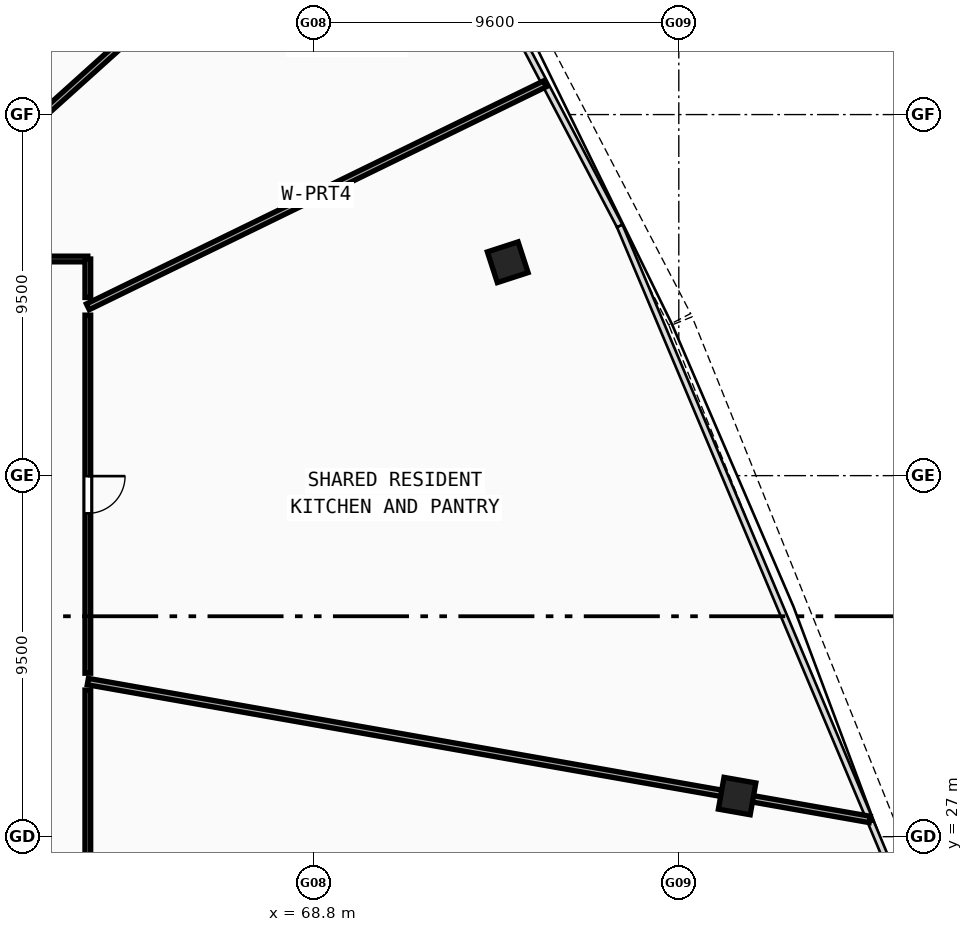
"""IFC4 building model, lengths in metres.
Left out: names, types, materials, properties, quantities, classifications, styles, units other than length and angle.
Written with IfcOpenShell. Run it as: python <this file> out.ifc"""

import sys

from ifc_helpers import new_model, si_unit, direction, frame, frame_2d, origin, origin_with_axes, origin_2d, place, context, subcontext, project, spatial, rectangle, hollow_rectangle, extrude, source, transform, mapped, element, fill, save


model = new_model("IFC4")
c1 = context("Model", 3, precision=1e-05, world=origin(), true_north=direction((0.0, 1.0)))
c2 = subcontext(c1, "Body", "Model", "MODEL_VIEW")
j1 = project(units=[si_unit("LENGTHUNIT", "METRE"), si_unit("PLANEANGLEUNIT", "RADIAN")], contexts=[c1])
p1 = place(None, origin())
s1 = spatial("IfcSite", under=j1, at=p1, CompositionType="ELEMENT")
p2 = place(p1, origin())
s2 = spatial("IfcBuilding", under=s1, at=p2, CompositionType="ELEMENT")
p3 = place(p2, frame((0.0, 0.0, 229.61)))
s3 = spatial("IfcBuildingStorey", under=s2, at=p3, CompositionType="ELEMENT", Elevation=229.61)
m1 = source(origin(), c2, "Body", "SweptSolid", [
    extrude(hollow_rectangle(XDim=0.85, YDim=0.85, WallThickness=0.034, at=origin_2d()), origin(), (0.0, 0.0, 1.0), 3.73),
])
for number, where, z_axis, x_axis in (
    (1, (79.934, 28.069, -0.26), (0.0, 0.0, 1.0), (0.174, 0.985, 0.0)),
    (2, (73.899, 42.115, -0.26), (0.0, 0.0, 1.0), (-0.309, 0.951, 0.0)),
):
    element("IfcColumn", number, at=place(p3, frame(where, z_axis=z_axis, x_axis=x_axis)), inside=s3, PredefinedType="COLUMN", context=c2, shape_type="MappedRepresentation", body=[
        mapped(m1, transform((0.0, 0.0, 0.0), scale=1.0)),
    ])
p4 = place(p3, frame((62.85, 40.943, 0.0), z_axis=(0.0, 0.0, 1.0), x_axis=(0.89879807188, 0.438362893029, 0.0)))
e3 = element("IfcWall", 3, at=p4, inside=s3, PredefinedType="PARTITIONING", context=c2, shape_type="SweptSolid", body=[
    extrude(rectangle(XDim=13.384, YDim=0.17, at=frame_2d((6.692, 0.0))), origin(), (0.0, 0.0, 1.0), 2.82),
])
p5 = place(p3, frame((57.44, 42.2, 0.0), z_axis=(0.0, 0.0, 1.0), x_axis=(0.743147575456, 0.669127552185, 0.0)))
e4 = element("IfcWall", 4, at=p5, inside=s3, PredefinedType="PARTITIONING", context=c2, shape_type="SweptSolid", body=[
    extrude(rectangle(XDim=18.141, YDim=0.17, at=frame_2d((9.07, 0.0))), origin(), (0.0, 0.0, 1.0), 2.82),
])
p6 = place(p3, frame((51.784, 42.2, 0.0), z_axis=(0.0, 0.0, 1.0), x_axis=(0.406737084028, 0.913545261318, 0.0)))
e5 = element("IfcWall", 5, at=p6, inside=s3, PredefinedType="PARTITIONING", context=c2, shape_type="SweptSolid", body=[
    extrude(rectangle(XDim=27.09, YDim=0.17, at=frame_2d((13.545, 0.0))), origin(), (0.0, 0.0, 1.0), 2.82),
])
p7 = place(p3, frame((62.85, 31.082, 0.0), z_axis=(0.0, 0.0, 1.0), x_axis=(0.984808138799, -0.17364598975, 0.0)))
e6 = element("IfcWall", 6, at=p7, inside=s3, PredefinedType="PARTITIONING", context=c2, shape_type="SweptSolid", body=[
    extrude(rectangle(XDim=20.89, YDim=0.17, at=frame_2d((10.445, 0.0))), origin(), (0.0, 0.0, 1.0), 2.82),
])
p8 = place(p3, frame((57.769, 42.2, 0.0), z_axis=(0.0, 0.0, 1.0), x_axis=(1.0, 0.0, 0.0)))
e7 = element("IfcWall", 7, at=p8, inside=s3, PredefinedType="PARTITIONING", context=c2, shape_type="SweptSolid", body=[
    extrude(rectangle(XDim=5.081, YDim=0.15, at=frame_2d((2.541, 0.0))), origin(), (0.0, 0.0, 1.0), 3.12),
])
p9 = place(p8, frame((2.131, 0.0, 0.0)))
e8 = element("IfcOpeningElement", 8, at=p9, cuts=e7, PredefinedType="OPENING", context=c2, shape_type="SweptSolid", body=[
    extrude(rectangle(XDim=0.98, YDim=2.12, at=frame_2d((0.49, 1.06))), frame((0.0, 0.085, 0.0), z_axis=(0.0, -1.0, 0.0), x_axis=(1.0, 0.0, 0.0)), (0.0, 0.0, 1.0), 0.17),
])
p10 = place(p3, frame((62.85, 42.2, 0.0), z_axis=(0.0, 0.0, 1.0), x_axis=(0.0, -1.0, 0.0)))
e9 = element("IfcWall", 9, at=p10, inside=s3, PredefinedType="PARTITIONING", context=c2, shape_type="SweptSolid", body=[
    extrude(rectangle(XDim=1.012, YDim=0.15, at=frame_2d((0.506, 0.0))), origin(), (0.0, 0.0, 1.0), 3.12),
])
p11 = place(p3, frame((62.85, 40.723, 0.0), z_axis=(0.0, 0.0, 1.0), x_axis=(0.0, -1.0, 0.0)))
e10 = element("IfcWall", 10, at=p11, inside=s3, PredefinedType="PARTITIONING", context=c2, shape_type="SweptSolid", body=[
    extrude(rectangle(XDim=9.422, YDim=0.15, at=frame_2d((4.711, 0.0))), origin(), (0.0, 0.0, 1.0), 2.82),
])
p12 = place(p11, frame((4.236, 0.0, 0.0)))
e11 = element("IfcOpeningElement", 11, at=p12, cuts=e10, PredefinedType="OPENING", context=c2, shape_type="SweptSolid", body=[
    extrude(rectangle(XDim=0.98, YDim=2.12, at=frame_2d((0.49, 1.06))), frame((0.0, 0.085, 0.0), z_axis=(0.0, -1.0, 0.0), x_axis=(1.0, 0.0, 0.0)), (0.0, 0.0, 1.0), 0.17),
])
p13 = place(p3, frame((62.85, 30.858, 0.0), z_axis=(0.0, 0.0, 1.0), x_axis=(0.0, -1.0, 0.0)))
e12 = element("IfcWall", 12, at=p13, inside=s3, PredefinedType="PARTITIONING", context=c2, shape_type="SweptSolid", body=[
    extrude(rectangle(XDim=5.958, YDim=0.15, at=frame_2d((2.979, 0.0))), origin(), (0.0, 0.0, 1.0), 3.12),
])
m2 = source(origin(), c2, "Body", "SweptSolid", [
    extrude(rectangle(XDim=0.98, YDim=2.12, at=frame_2d((0.49, 1.06))), frame((0.0, 0.025, 0.0), z_axis=(0.0, -1.0, 0.0), x_axis=(1.0, 0.0, 0.0)), (0.0, 0.0, 1.0), 0.05),
])
p14 = place(p12, origin_with_axes())
e13 = element("IfcDoor", 13, at=p14, inside=s3, OperationType="SINGLE_SWING_LEFT", PredefinedType="DOOR", context=c2, shape_type="MappedRepresentation", body=[
    mapped(m2, transform((0.0, 0.0, 0.0), scale=1.0)),
])
fill(e11, e13)
save(model, sys.argv[1])
